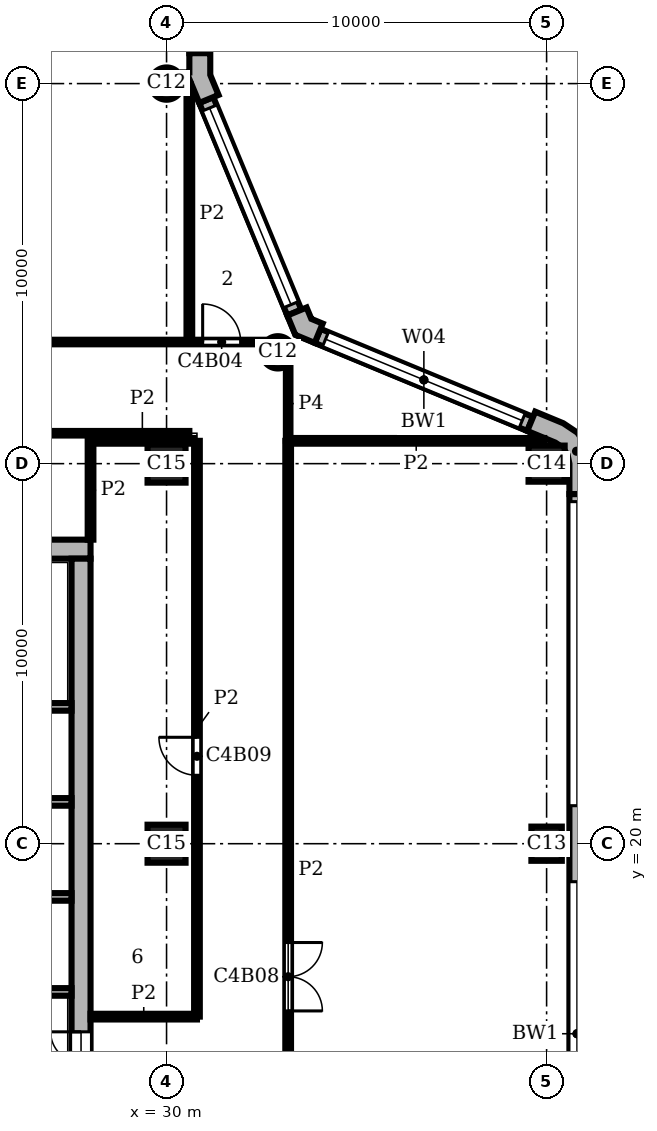
"""IFC4 building model, lengths in metres.
Left out: names, types, materials, properties, quantities, classifications, styles, units other than length and angle.
Written with IfcOpenShell. Run it as: python <this file> out.ifc"""

import sys

from ifc_helpers import new_model, si_unit, direction, frame, frame_2d, origin, origin_2d, place, context, subcontext, project, spatial, polyline, rectangle, circle, outline, extrude, element, fill, save


model = new_model("IFC4")
c1 = context("Model", 3, precision=1e-05, world=origin(), true_north=direction((0.0, 1.0)))
c2 = subcontext(c1, "Body", "Model", "MODEL_VIEW")
j1 = project(units=[si_unit("LENGTHUNIT", "METRE"), si_unit("PLANEANGLEUNIT", "RADIAN")], contexts=[c1])
p1 = place(None, origin())
s1 = spatial("IfcSite", under=j1, at=p1, CompositionType="ELEMENT")
p2 = place(p1, origin())
s2 = spatial("IfcBuilding", under=s1, at=p2, CompositionType="ELEMENT")
p3 = place(p2, frame((0.0, 0.0, 282.6)))
s3 = spatial("IfcBuildingStorey", under=s2, at=p3, CompositionType="ELEMENT", Elevation=282.6)
p4 = place(p3, frame((40.0, 20.0, 0.0), z_axis=(0.0, 0.0, 1.0), x_axis=(0.0, 1.0, 0.0)))
e1 = element("IfcColumn", 1, at=p4, inside=s3, PredefinedType="COLUMN", context=c2, shape_type="SweptSolid", body=[
    extrude(rectangle(XDim=0.9, YDim=0.8, at=origin_2d()), origin(), (0.0, 0.0, 1.0), 3.9),
])
p5 = place(p3, frame((40.0, 30.0, 0.0), z_axis=(0.0, 0.0, 1.0), x_axis=(1.0, 0.0, 0.0)))
e2 = element("IfcColumn", 2, at=p5, inside=s3, PredefinedType="COLUMN", context=c2, shape_type="SweptSolid", body=[
    extrude(rectangle(XDim=0.95, YDim=0.95, at=origin_2d()), origin(), (0.0, 0.0, 1.0), 3.9),
])
for number, where, z_axis, x_axis in (
    (3, (32.929, 32.929, 0.0), (0.0, 0.0, 1.0), (1.0, 0.0, 0.0)),
    (4, (30.0, 40.0, 0.0), (0.0, 0.0, 1.0), (1.0, 0.0, 0.0)),
):
    element("IfcColumn", number, at=place(p3, frame(where, z_axis=z_axis, x_axis=x_axis)), inside=s3, PredefinedType="COLUMN", context=c2, shape_type="SweptSolid", body=[
        extrude(circle(Radius=0.425, at=origin_2d()), origin(), (0.0, 0.0, 1.0), 3.9),
    ])
for number, where, z_axis, x_axis in (
    (5, (30.0, 20.0, 0.0), (0.0, 0.0, 1.0), (1.0, 0.0, 0.0)),
    (6, (30.0, 30.0, 0.0), (0.0, 0.0, 1.0), (1.0, 0.0, 0.0)),
):
    element("IfcColumn", number, at=place(p3, frame(where, z_axis=z_axis, x_axis=x_axis)), inside=s3, PredefinedType="COLUMN", context=c2, shape_type="SweptSolid", body=[
        extrude(rectangle(XDim=1.0, YDim=1.0, at=origin_2d()), origin(), (0.0, 0.0, 1.0), 3.9),
    ])
p6 = place(p3, frame((27.75, 8.5, 0.0), z_axis=(0.0, 0.0, 1.0), x_axis=(0.0, 1.0, 0.0)))
e7 = element("IfcWall", 7, at=p6, inside=s3, PredefinedType="SHEAR", context=c2, shape_type="SweptSolid", body=[
    extrude(rectangle(XDim=19.0, YDim=0.5, at=frame_2d((9.5, 0.0))), origin(), (0.0, 0.0, 1.0), 3.9),
])
p7 = place(p6, frame((4.95, 0.0, 0.0)))
e8 = element("IfcOpeningElement", 8, at=p7, cuts=e7, PredefinedType="OPENING", context=c2, shape_type="SweptSolid", body=[
    extrude(rectangle(XDim=1.6, YDim=2.1, at=frame_2d((0.8, 1.05))), frame((0.0, 0.26, 0.0), z_axis=(0.0, -1.0, 0.0), x_axis=(1.0, 0.0, 0.0)), (0.0, 0.0, 1.0), 0.52),
])
p8 = place(p3, frame((28.0, 27.75, 0.0), z_axis=(0.0, 0.0, 1.0), x_axis=(-1.0, 0.0, 0.0)))
e9 = element("IfcWall", 9, at=p8, inside=s3, PredefinedType="SHEAR", context=c2, shape_type="SweptSolid", body=[
    extrude(rectangle(XDim=20.0, YDim=0.5, at=frame_2d((10.0, 0.0))), origin(), (0.0, 0.0, 1.0), 3.9),
])
p9 = place(p3, origin())
e10 = element("IfcWall", 10, at=p9, inside=s3, PredefinedType="SOLIDWALL", context=c2, shape_type="SweptSolid", body=[
    extrude(outline(polyline([(41.0, 29.2), (41.15, 29.2), (41.15, 30.0), (41.062, 30.44), (40.813, 30.813), (40.44, 31.062), (39.701, 31.369), (39.644, 31.23), (39.49, 30.861), (40.229, 30.554), (40.424, 30.424), (40.554, 30.229), (40.6, 30.0), (40.6, 29.2), (41.0, 29.2)])), origin(), (0.0, 0.0, 1.0), 3.9),
])
e11 = element("IfcWall", 11, at=p9, inside=s3, PredefinedType="SOLIDWALL", context=c2, shape_type="SweptSolid", body=[
    extrude(outline(polyline([(34.051, 33.547), (34.108, 33.685), (33.809, 33.809), (33.685, 34.108), (33.547, 34.051), (33.177, 33.898), (33.388, 33.388), (33.898, 33.177), (34.051, 33.547)])), origin(), (0.0, 0.0, 1.0), 3.9),
])
e12 = element("IfcWall", 12, at=p9, inside=s3, PredefinedType="SOLIDWALL", context=c2, shape_type="SweptSolid", body=[
    extrude(outline(polyline([(30.62, 39.995), (30.62, 40.071), (30.861, 39.49), (31.23, 39.644), (31.369, 39.701), (31.15, 40.229), (31.15, 40.8), (31.0, 40.8), (30.6, 40.8), (30.6, 40.295), (30.425, 40.295), (30.425, 39.995), (30.62, 39.995)])), origin(), (0.0, 0.0, 1.0), 3.9),
])
p10 = place(p3, frame((40.8, 0.8, 0.0), z_axis=(0.0, 0.0, 1.0), x_axis=(0.0, 1.0, 0.0)))
e13 = element("IfcWall", 13, at=p10, inside=s3, PredefinedType="SOLIDWALL", context=c2, shape_type="SweptSolid", body=[
    extrude(rectangle(XDim=28.4, YDim=0.4, at=frame_2d((14.2, 0.0))), origin(), (0.0, 0.0, 1.0), 3.9),
])
p11 = place(p10, frame((0.2, 0.0, 0.9)))
e14 = element("IfcOpeningElement", 14, at=p11, cuts=e13, PredefinedType="OPENING", context=c2, shape_type="SweptSolid", body=[
    extrude(rectangle(XDim=8.0, YDim=2.35, at=frame_2d((4.0, 1.175))), frame((0.0, 0.21, 0.0), z_axis=(0.0, -1.0, 0.0), x_axis=(1.0, 0.0, 0.0)), (0.0, 0.0, 1.0), 0.42),
])
p12 = place(p10, frame((10.2, 0.0, 0.9)))
e15 = element("IfcOpeningElement", 15, at=p12, cuts=e13, PredefinedType="OPENING", context=c2, shape_type="SweptSolid", body=[
    extrude(rectangle(XDim=8.0, YDim=2.35, at=frame_2d((4.0, 1.175))), frame((0.0, 0.21, 0.0), z_axis=(0.0, -1.0, 0.0), x_axis=(1.0, 0.0, 0.0)), (0.0, 0.0, 1.0), 0.42),
])
p13 = place(p10, frame((20.2, 0.0, 0.9)))
e16 = element("IfcOpeningElement", 16, at=p13, cuts=e13, PredefinedType="OPENING", context=c2, shape_type="SweptSolid", body=[
    extrude(rectangle(XDim=8.0, YDim=2.35, at=frame_2d((4.0, 1.175))), frame((0.0, 0.21, 0.0), z_axis=(0.0, -1.0, 0.0), x_axis=(1.0, 0.0, 0.0)), (0.0, 0.0, 1.0), 0.42),
])
p14 = place(p3, frame((39.567, 31.045, 0.0), z_axis=(0.0, 0.0, 1.0), x_axis=(-0.923891000409, 0.382655745237, 0.0)))
e17 = element("IfcWall", 17, at=p14, inside=s3, PredefinedType="SOLIDWALL", context=c2, shape_type="SweptSolid", body=[
    extrude(rectangle(XDim=6.053, YDim=0.4, at=frame_2d((3.027, 0.0))), origin(), (0.0, 0.0, 1.0), 3.9),
])
p15 = place(p14, frame((0.227, 0.0, 0.9)))
e18 = element("IfcOpeningElement", 18, at=p15, cuts=e17, PredefinedType="OPENING", context=c2, shape_type="SweptSolid", body=[
    extrude(rectangle(XDim=5.6, YDim=2.35, at=frame_2d((2.8, 1.175))), frame((0.0, 0.21, 0.0), z_axis=(0.0, -1.0, 0.0), x_axis=(1.0, 0.0, 0.0)), (0.0, 0.0, 1.0), 0.42),
])
p16 = place(p3, frame((33.362, 33.974, 0.0), z_axis=(0.0, 0.0, 1.0), x_axis=(-0.382655745237, 0.923891000409, 0.0)))
e19 = element("IfcWall", 19, at=p16, inside=s3, PredefinedType="SOLIDWALL", context=c2, shape_type="SweptSolid", body=[
    extrude(rectangle(XDim=6.053, YDim=0.4, at=frame_2d((3.027, 0.0))), origin(), (0.0, 0.0, 1.0), 3.9),
])
p17 = place(p16, frame((0.227, 0.0, 0.9)))
e20 = element("IfcOpeningElement", 20, at=p17, cuts=e19, PredefinedType="OPENING", context=c2, shape_type="SweptSolid", body=[
    extrude(rectangle(XDim=5.6, YDim=2.35, at=frame_2d((2.8, 1.175))), frame((0.0, 0.21, 0.0), z_axis=(0.0, -1.0, 0.0), x_axis=(1.0, 0.0, 0.0)), (0.0, 0.0, 1.0), 0.42),
])
p18 = place(p3, frame((30.8, 40.8, 0.0), z_axis=(0.0, 0.0, 1.0), x_axis=(0.0, 1.0, 0.0)))
e21 = element("IfcWall", 21, at=p18, inside=s3, PredefinedType="SOLIDWALL", context=c2, shape_type="SweptSolid", body=[
    extrude(rectangle(XDim=18.4, YDim=0.4, at=frame_2d((9.2, 0.0))), origin(), (0.0, 0.0, 1.0), 3.9),
])
p19 = place(p18, frame((0.2, 0.0, 0.9)))
e22 = element("IfcOpeningElement", 22, at=p19, cuts=e21, PredefinedType="OPENING", context=c2, shape_type="SweptSolid", body=[
    extrude(rectangle(XDim=8.0, YDim=2.35, at=frame_2d((4.0, 1.175))), frame((0.0, 0.21, 0.0), z_axis=(0.0, -1.0, 0.0), x_axis=(1.0, 0.0, 0.0)), (0.0, 0.0, 1.0), 0.42),
])
p20 = place(p18, frame((10.2, 0.0, 0.9)))
e23 = element("IfcOpeningElement", 23, at=p20, cuts=e21, PredefinedType="OPENING", context=c2, shape_type="SweptSolid", body=[
    extrude(rectangle(XDim=8.0, YDim=2.35, at=frame_2d((4.0, 1.175))), frame((0.0, 0.21, 0.0), z_axis=(0.0, -1.0, 0.0), x_axis=(1.0, 0.0, 0.0)), (0.0, 0.0, 1.0), 0.42),
])
for number, where, z_axis, x_axis in (
    (24, (24.3, 16.1, 0.0), (0.0, 0.0, 1.0), (1.0, 0.0, 0.0)),
    (25, (24.3, 18.6, 0.0), (0.0, 0.0, 1.0), (1.0, 0.0, 0.0)),
    (26, (24.3, 21.1, 0.0), (0.0, 0.0, 1.0), (1.0, 0.0, 0.0)),
):
    element("IfcWall", number, at=place(p3, frame(where, z_axis=z_axis, x_axis=x_axis)), inside=s3, PredefinedType="SHEAR", context=c2, shape_type="SweptSolid", body=[
        extrude(rectangle(XDim=3.2, YDim=0.2, at=frame_2d((1.6, 0.0))), origin(), (0.0, 0.0, 1.0), 3.58),
    ])
p21 = place(p3, frame((13.8, 23.6, 0.0), z_axis=(0.0, 0.0, 1.0), x_axis=(1.0, 0.0, 0.0)))
e27 = element("IfcWall", 27, at=p21, inside=s3, PredefinedType="SHEAR", context=c2, shape_type="SweptSolid", body=[
    extrude(rectangle(XDim=13.7, YDim=0.2, at=frame_2d((6.85, 0.0))), origin(), (0.0, 0.0, 1.0), 3.58),
])
p22 = place(p21, frame((2.4, 0.0, 0.0)))
e28 = element("IfcOpeningElement", 28, at=p22, cuts=e27, PredefinedType="OPENING", context=c2, shape_type="SweptSolid", body=[
    extrude(rectangle(XDim=1.1, YDim=2.1, at=frame_2d((0.55, 1.05))), frame((0.0, 0.11, 0.0), z_axis=(0.0, -1.0, 0.0), x_axis=(1.0, 0.0, 0.0)), (0.0, 0.0, 1.0), 0.22),
])
p23 = place(p21, frame((4.9, 0.0, 0.0)))
e29 = element("IfcOpeningElement", 29, at=p23, cuts=e27, PredefinedType="OPENING", context=c2, shape_type="SweptSolid", body=[
    extrude(rectangle(XDim=1.1, YDim=2.1, at=frame_2d((0.55, 1.05))), frame((0.0, 0.11, 0.0), z_axis=(0.0, -1.0, 0.0), x_axis=(1.0, 0.0, 0.0)), (0.0, 0.0, 1.0), 0.22),
])
p24 = place(p21, frame((0.15, 0.0, 0.0)))
e30 = element("IfcOpeningElement", 30, at=p24, cuts=e27, PredefinedType="OPENING", context=c2, shape_type="SweptSolid", body=[
    extrude(rectangle(XDim=1.0, YDim=2.1, at=frame_2d((0.5, 1.05))), frame((0.0, 0.11, 0.0), z_axis=(0.0, -1.0, 0.0), x_axis=(1.0, 0.0, 0.0)), (0.0, 0.0, 1.0), 0.22),
])
p25 = place(p3, frame((28.0, 28.0, 0.0), z_axis=(0.0, 0.0, 1.0), x_axis=(0.0, 1.0, 0.0)))
e31 = element("IfcWall", 31, at=p25, inside=s3, PredefinedType="PARTITIONING", context=c2, shape_type="SweptSolid", body=[
    extrude(rectangle(XDim=2.598, YDim=0.15, at=frame_2d((1.299, 0.0))), origin(), (0.0, 0.0, 1.0), 3.58),
])
p26 = place(p3, frame((30.6, 33.2, 0.0), z_axis=(0.0, 0.0, 1.0), x_axis=(0.0, 1.0, 0.0)))
e32 = element("IfcWall", 32, at=p26, inside=s3, PredefinedType="PARTITIONING", context=c2, shape_type="SweptSolid", body=[
    extrude(rectangle(XDim=6.738, YDim=0.15, at=frame_2d((3.369, 0.0))), origin(), (0.0, 0.0, 1.0), 3.58),
])
p27 = place(p3, frame((30.8, 15.45, 0.0), z_axis=(0.0, 0.0, 1.0), x_axis=(0.0, 1.0, 0.0)))
e33 = element("IfcWall", 33, at=p27, inside=s3, PredefinedType="PARTITIONING", context=c2, shape_type="SweptSolid", body=[
    extrude(rectangle(XDim=15.15, YDim=0.15, at=frame_2d((7.575, 0.0))), origin(), (0.0, 0.0, 1.0), 3.58),
])
p28 = place(p27, frame((6.35, 0.0, 0.0)))
e34 = element("IfcOpeningElement", 34, at=p28, cuts=e33, PredefinedType="OPENING", context=c2, shape_type="SweptSolid", body=[
    extrude(rectangle(XDim=1.0, YDim=2.1, at=frame_2d((0.5, 1.05))), frame((0.0, 0.085, 0.0), z_axis=(0.0, -1.0, 0.0), x_axis=(1.0, 0.0, 0.0)), (0.0, 0.0, 1.0), 0.17),
])
p29 = place(p3, frame((33.2, 8.0, 0.0), z_axis=(0.0, 0.0, 1.0), x_axis=(0.0, 1.0, 0.0)))
e35 = element("IfcWall", 35, at=p29, inside=s3, PredefinedType="PARTITIONING", context=c2, shape_type="SweptSolid", body=[
    extrude(rectangle(XDim=22.6, YDim=0.15, at=frame_2d((11.3, 0.0))), origin(), (0.0, 0.0, 1.0), 3.58),
])
p30 = place(p29, frame((7.6, 0.0, 0.0)))
e36 = element("IfcOpeningElement", 36, at=p30, cuts=e35, PredefinedType="OPENING", context=c2, shape_type="SweptSolid", body=[
    extrude(rectangle(XDim=1.8, YDim=2.1, at=frame_2d((0.9, 1.05))), frame((0.0, 0.085, 0.0), z_axis=(0.0, -1.0, 0.0), x_axis=(1.0, 0.0, 0.0)), (0.0, 0.0, 1.0), 0.17),
])
p31 = place(p3, frame((28.0, 15.45, 0.0), z_axis=(0.0, 0.0, 1.0), x_axis=(1.0, 0.0, 0.0)))
e37 = element("IfcWall", 37, at=p31, inside=s3, PredefinedType="PARTITIONING", context=c2, shape_type="SweptSolid", body=[
    extrude(rectangle(XDim=2.8, YDim=0.15, at=frame_2d((1.4, 0.0))), origin(), (0.0, 0.0, 1.0), 3.58),
])
p32 = place(p3, frame((28.002, 30.6, 0.0), z_axis=(0.0, 0.0, 1.0), x_axis=(1.0, 0.0, 0.0)))
e38 = element("IfcWall", 38, at=p32, inside=s3, PredefinedType="PARTITIONING", context=c2, shape_type="SweptSolid", body=[
    extrude(rectangle(XDim=2.723, YDim=0.15, at=frame_2d((1.362, 0.0))), origin(), (0.0, 0.0, 1.0), 3.58),
])
p33 = place(p3, frame((33.2, 30.6, 0.0), z_axis=(0.0, 0.0, 1.0), x_axis=(1.0, 0.0, 0.0)))
e39 = element("IfcWall", 39, at=p33, inside=s3, PredefinedType="PARTITIONING", context=c2, shape_type="SweptSolid", body=[
    extrude(rectangle(XDim=6.738, YDim=0.15, at=frame_2d((3.369, 0.0))), origin(), (0.0, 0.0, 1.0), 3.58),
])
p34 = place(p3, frame((33.2, 30.6, 0.0), z_axis=(0.0, 0.0, 1.0), x_axis=(0.0, 1.0, 0.0)))
e40 = element("IfcWall", 40, at=p34, inside=s3, PredefinedType="PARTITIONING", context=c2, shape_type="SweptSolid", body=[
    extrude(rectangle(XDim=1.96, YDim=0.12, at=frame_2d((0.98, 0.0))), origin(), (0.0, 0.0, 1.0), 3.58),
])
p35 = place(p3, frame((13.802, 30.8, 0.0), z_axis=(0.0, 0.0, 1.0), x_axis=(1.0, 0.0, 0.0)))
e41 = element("IfcWall", 41, at=p35, inside=s3, PredefinedType="PARTITIONING", context=c2, shape_type="SweptSolid", body=[
    extrude(rectangle(XDim=16.798, YDim=0.12, at=frame_2d((8.399, 0.0))), origin(), (0.0, 0.0, 1.0), 3.58),
])
p36 = place(p35, frame((9.1, 0.0, 0.0)))
e42 = element("IfcOpeningElement", 42, at=p36, cuts=e41, PredefinedType="OPENING", context=c2, shape_type="SweptSolid", body=[
    extrude(rectangle(XDim=1.0, YDim=2.1, at=frame_2d((0.5, 1.05))), frame((0.0, 0.07, 0.0), z_axis=(0.0, -1.0, 0.0), x_axis=(1.0, 0.0, 0.0)), (0.0, 0.0, 1.0), 0.14),
])
p37 = place(p3, frame((16.2, 33.2, 0.0), z_axis=(0.0, 0.0, 1.0), x_axis=(1.0, 0.0, 0.0)))
e43 = element("IfcWall", 43, at=p37, inside=s3, PredefinedType="PARTITIONING", context=c2, shape_type="SweptSolid", body=[
    extrude(rectangle(XDim=16.36, YDim=0.12, at=frame_2d((8.18, 0.0))), origin(), (0.0, 0.0, 1.0), 3.58),
])
p38 = place(p37, frame((14.75, 0.0, 0.0)))
e44 = element("IfcOpeningElement", 44, at=p38, cuts=e43, PredefinedType="OPENING", context=c2, shape_type="SweptSolid", body=[
    extrude(rectangle(XDim=1.0, YDim=2.1, at=frame_2d((0.5, 1.05))), frame((0.0, 0.07, 0.0), z_axis=(0.0, -1.0, 0.0), x_axis=(1.0, 0.0, 0.0)), (0.0, 0.0, 1.0), 0.14),
])
p39 = place(p12, origin())
e45 = element("IfcWindow", 45, at=p39, inside=s3, PartitioningType="SINGLE_PANEL", PredefinedType="WINDOW", context=c2, shape_type="SweptSolid", body=[
    extrude(rectangle(XDim=8.0, YDim=2.35, at=frame_2d((4.0, 1.175))), frame((0.0, 0.16, 0.0), z_axis=(0.0, -1.0, 0.0), x_axis=(1.0, 0.0, 0.0)), (0.0, 0.0, 1.0), 0.06),
])
fill(e15, e45)
p40 = place(p13, origin())
e46 = element("IfcWindow", 46, at=p40, inside=s3, PartitioningType="SINGLE_PANEL", PredefinedType="WINDOW", context=c2, shape_type="SweptSolid", body=[
    extrude(rectangle(XDim=8.0, YDim=2.35, at=frame_2d((4.0, 1.175))), frame((0.0, 0.16, 0.0), z_axis=(0.0, -1.0, 0.0), x_axis=(1.0, 0.0, 0.0)), (0.0, 0.0, 1.0), 0.06),
])
fill(e16, e46)
p41 = place(p15, origin())
e47 = element("IfcWindow", 47, at=p41, inside=s3, PartitioningType="SINGLE_PANEL", PredefinedType="WINDOW", context=c2, shape_type="SweptSolid", body=[
    extrude(rectangle(XDim=5.6, YDim=2.35, at=frame_2d((2.8, 1.175))), frame((0.0, 0.16, 0.0), z_axis=(0.0, -1.0, 0.0), x_axis=(1.0, 0.0, 0.0)), (0.0, 0.0, 1.0), 0.06),
])
fill(e18, e47)
p42 = place(p17, origin())
e48 = element("IfcWindow", 48, at=p42, inside=s3, PartitioningType="SINGLE_PANEL", PredefinedType="WINDOW", context=c2, shape_type="SweptSolid", body=[
    extrude(rectangle(XDim=5.6, YDim=2.35, at=frame_2d((2.8, 1.175))), frame((0.0, 0.16, 0.0), z_axis=(0.0, -1.0, 0.0), x_axis=(1.0, 0.0, 0.0)), (0.0, 0.0, 1.0), 0.06),
])
fill(e20, e48)
p43 = place(p7, origin())
e49 = element("IfcDoor", 49, at=p43, inside=s3, OperationType="DOUBLE_DOOR_SINGLE_SWING", PredefinedType="DOOR", context=c2, shape_type="SweptSolid", body=[
    extrude(rectangle(XDim=1.6, YDim=2.1, at=frame_2d((0.8, 1.05))), frame((0.0, 0.025, 0.0), z_axis=(0.0, -1.0, 0.0), x_axis=(1.0, 0.0, 0.0)), (0.0, 0.0, 1.0), 0.05),
])
fill(e8, e49)
p44 = place(p38, origin())
e50 = element("IfcDoor", 50, at=p44, inside=s3, OperationType="SINGLE_SWING_LEFT", PredefinedType="DOOR", context=c2, shape_type="SweptSolid", body=[
    extrude(rectangle(XDim=1.0, YDim=2.1, at=frame_2d((0.5, 1.05))), frame((0.0, 0.025, 0.0), z_axis=(0.0, -1.0, 0.0), x_axis=(1.0, 0.0, 0.0)), (0.0, 0.0, 1.0), 0.05),
])
fill(e44, e50)
p45 = place(p30, frame((1.8, 0.0, 0.0), z_axis=(0.0, 0.0, 1.0), x_axis=(-1.0, 0.0, 0.0)))
e51 = element("IfcDoor", 51, at=p45, inside=s3, OperationType="DOUBLE_DOOR_SINGLE_SWING", PredefinedType="DOOR", context=c2, shape_type="SweptSolid", body=[
    extrude(rectangle(XDim=1.8, YDim=2.1, at=frame_2d((0.9, 1.05))), frame((0.0, 0.025, 0.0), z_axis=(0.0, -1.0, 0.0), x_axis=(1.0, 0.0, 0.0)), (0.0, 0.0, 1.0), 0.05),
])
fill(e36, e51)
p46 = place(p28, origin())
e52 = element("IfcDoor", 52, at=p46, inside=s3, OperationType="SINGLE_SWING_RIGHT", PredefinedType="DOOR", context=c2, shape_type="SweptSolid", body=[
    extrude(rectangle(XDim=1.0, YDim=2.1, at=frame_2d((0.5, 1.05))), frame((0.0, 0.025, 0.0), z_axis=(0.0, -1.0, 0.0), x_axis=(1.0, 0.0, 0.0)), (0.0, 0.0, 1.0), 0.05),
])
fill(e34, e52)
save(model, sys.argv[1])
